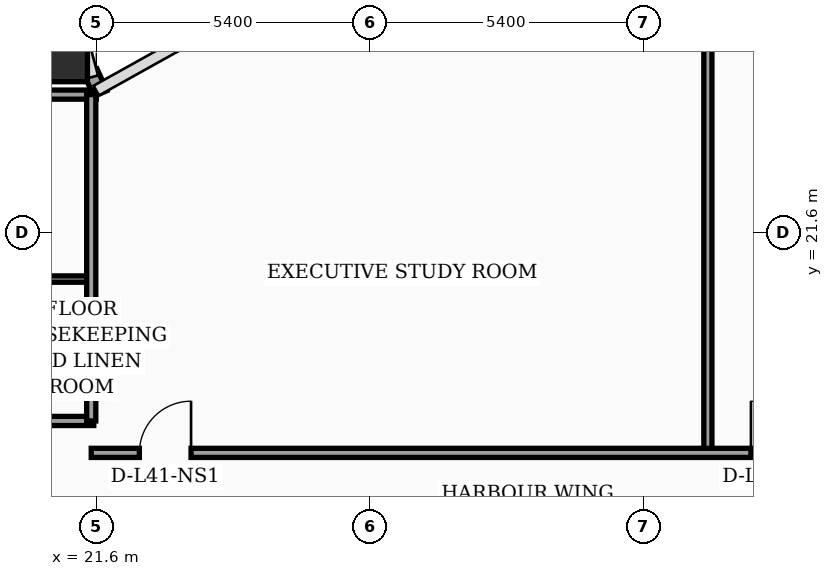
"""IFC4 building model, lengths in metres.
Left out: names, types, materials, properties, quantities, classifications, styles, units other than length and angle.
Written with IfcOpenShell. Run it as: python <this file> out.ifc"""

import sys

from ifc_helpers import new_model, si_unit, direction, frame, frame_2d, origin, origin_2d, place, context, subcontext, project, spatial, rectangle, hollow_rectangle, extrude, element, fill, save


model = new_model("IFC4")
c1 = context("Model", 3, precision=1e-05, world=origin(), true_north=direction((0.0, 1.0)))
c2 = subcontext(c1, "Body", "Model", "MODEL_VIEW")
j1 = project(units=[si_unit("LENGTHUNIT", "METRE"), si_unit("PLANEANGLEUNIT", "RADIAN")], contexts=[c1])
p1 = place(None, origin())
s1 = spatial("IfcSite", under=j1, at=p1, CompositionType="ELEMENT")
p2 = place(p1, origin())
s2 = spatial("IfcBuilding", under=s1, at=p2, CompositionType="ELEMENT")
p3 = place(p2, frame((0.0, 0.0, 167.5)))
s3 = spatial("IfcBuildingStorey", under=s2, at=p3, CompositionType="ELEMENT", Elevation=167.5)
p4 = place(p3, frame((21.0, 25.0, 0.0), z_axis=(0.0, 0.0, 1.0), x_axis=(1.0, 0.0, 0.0)))
e1 = element("IfcColumn", 1, at=p4, inside=s3, PredefinedType="COLUMN", context=c2, shape_type="SweptSolid", body=[
    extrude(hollow_rectangle(XDim=0.85, YDim=0.85, WallThickness=0.036, at=origin_2d()), origin(), (0.0, 0.0, 1.0), 3.56),
])
p5 = place(p3, frame((21.68, 24.34, 0.0), z_axis=(0.0, 0.0, 1.0), x_axis=(-0.40758134973, 0.913168901875, 0.0)))
e2 = element("IfcWall", 2, at=p5, inside=s3, PredefinedType="SOLIDWALL", context=c2, shape_type="SweptSolid", body=[
    extrude(rectangle(XDim=0.471, YDim=0.28, at=frame_2d((0.235, 0.0))), origin(), (0.0, 0.0, 1.0), 3.56),
])
p6 = place(p3, frame((17.25, 17.88, 0.0), z_axis=(0.0, 0.0, 1.0), x_axis=(1.0, 0.0, 0.0)))
e3 = element("IfcWall", 3, at=p6, inside=s3, PredefinedType="PARTITIONING", context=c2, shape_type="SweptSolid", body=[
    extrude(rectangle(XDim=4.3, YDim=0.18, at=frame_2d((2.15, 0.0))), origin(), (0.0, 0.0, 1.0), 3.56),
])
p7 = place(p3, frame((17.25, 20.68, 0.0), z_axis=(0.0, 0.0, 1.0), x_axis=(1.0, 0.0, 0.0)))
e4 = element("IfcWall", 4, at=p7, inside=s3, PredefinedType="PARTITIONING", context=c2, shape_type="SweptSolid", body=[
    extrude(rectangle(XDim=4.3, YDim=0.125, at=frame_2d((2.15, 0.0))), origin(), (0.0, 0.0, 1.0), 3.56),
])
p8 = place(p3, frame((17.25, 24.32, 0.0), z_axis=(0.0, 0.0, 1.0), x_axis=(1.0, 0.0, 0.0)))
e5 = element("IfcWall", 5, at=p8, inside=s3, PredefinedType="PARTITIONING", context=c2, shape_type="SweptSolid", body=[
    extrude(rectangle(XDim=4.35, YDim=0.18, at=frame_2d((2.175, 0.0))), origin(), (0.0, 0.0, 1.0), 3.56),
])
p9 = place(p3, frame((21.5, 17.88, 0.0), z_axis=(0.0, 0.0, 1.0), x_axis=(0.0, 1.0, 0.0)))
e6 = element("IfcWall", 6, at=p9, inside=s3, PredefinedType="PARTITIONING", context=c2, shape_type="SweptSolid", body=[
    extrude(rectangle(XDim=6.44, YDim=0.18, at=frame_2d((3.22, 0.0))), origin(), (0.0, 0.0, 1.0), 3.56),
])
p10 = place(p3, frame((33.67, 17.25, 0.0), z_axis=(0.0, 0.0, 1.0), x_axis=(0.0, 1.0, 0.0)))
e7 = element("IfcWall", 7, at=p10, inside=s3, PredefinedType="PARTITIONING", context=c2, shape_type="SweptSolid", body=[
    extrude(rectangle(XDim=13.96, YDim=0.16, at=frame_2d((6.98, 0.0))), origin(), (0.0, 0.0, 1.0), 2.94),
])
p11 = place(p3, frame((21.5, 17.25, 0.0), z_axis=(0.0, 0.0, 1.0), x_axis=(1.0, 0.0, 0.0)))
e8 = element("IfcWall", 8, at=p11, inside=s3, PredefinedType="PARTITIONING", context=c2, shape_type="SweptSolid", body=[
    extrude(rectangle(XDim=24.25, YDim=0.18, at=frame_2d((12.125, 0.0))), origin(), (0.0, 0.0, 1.0), 2.94),
])
p12 = place(p11, frame((0.95, 0.0, 0.0)))
e9 = element("IfcOpeningElement", 9, at=p12, cuts=e8, PredefinedType="OPENING", context=c2, shape_type="SweptSolid", body=[
    extrude(rectangle(XDim=1.02, YDim=2.2, at=frame_2d((0.51, 1.1))), frame((0.0, 0.1, 0.0), z_axis=(0.0, -1.0, 0.0), x_axis=(1.0, 0.0, 0.0)), (0.0, 0.0, 1.0), 0.2),
])
p13 = place(p11, frame((13.02, 0.0, 0.0)))
e10 = element("IfcOpeningElement", 10, at=p13, cuts=e8, PredefinedType="OPENING", context=c2, shape_type="SweptSolid", body=[
    extrude(rectangle(XDim=1.02, YDim=2.2, at=frame_2d((0.51, 1.1))), frame((0.0, 0.1, 0.0), z_axis=(0.0, -1.0, 0.0), x_axis=(1.0, 0.0, 0.0)), (0.0, 0.0, 1.0), 0.2),
])
p14 = place(p12, origin())
e11 = element("IfcDoor", 11, at=p14, inside=s3, OperationType="SINGLE_SWING_RIGHT", PredefinedType="DOOR", context=c2, shape_type="SweptSolid", body=[
    extrude(rectangle(XDim=1.02, YDim=2.2, at=frame_2d((0.51, 1.1))), frame((0.0, 0.025, 0.0), z_axis=(0.0, -1.0, 0.0), x_axis=(1.0, 0.0, 0.0)), (0.0, 0.0, 1.0), 0.05),
])
fill(e9, e11)
p15 = place(p13, origin())
e12 = element("IfcDoor", 12, at=p15, inside=s3, OperationType="SINGLE_SWING_LEFT", PredefinedType="DOOR", context=c2, shape_type="SweptSolid", body=[
    extrude(rectangle(XDim=1.02, YDim=2.2, at=frame_2d((0.51, 1.1))), frame((0.0, 0.025, 0.0), z_axis=(0.0, -1.0, 0.0), x_axis=(1.0, 0.0, 0.0)), (0.0, 0.0, 1.0), 0.05),
])
fill(e10, e12)
save(model, sys.argv[1])
